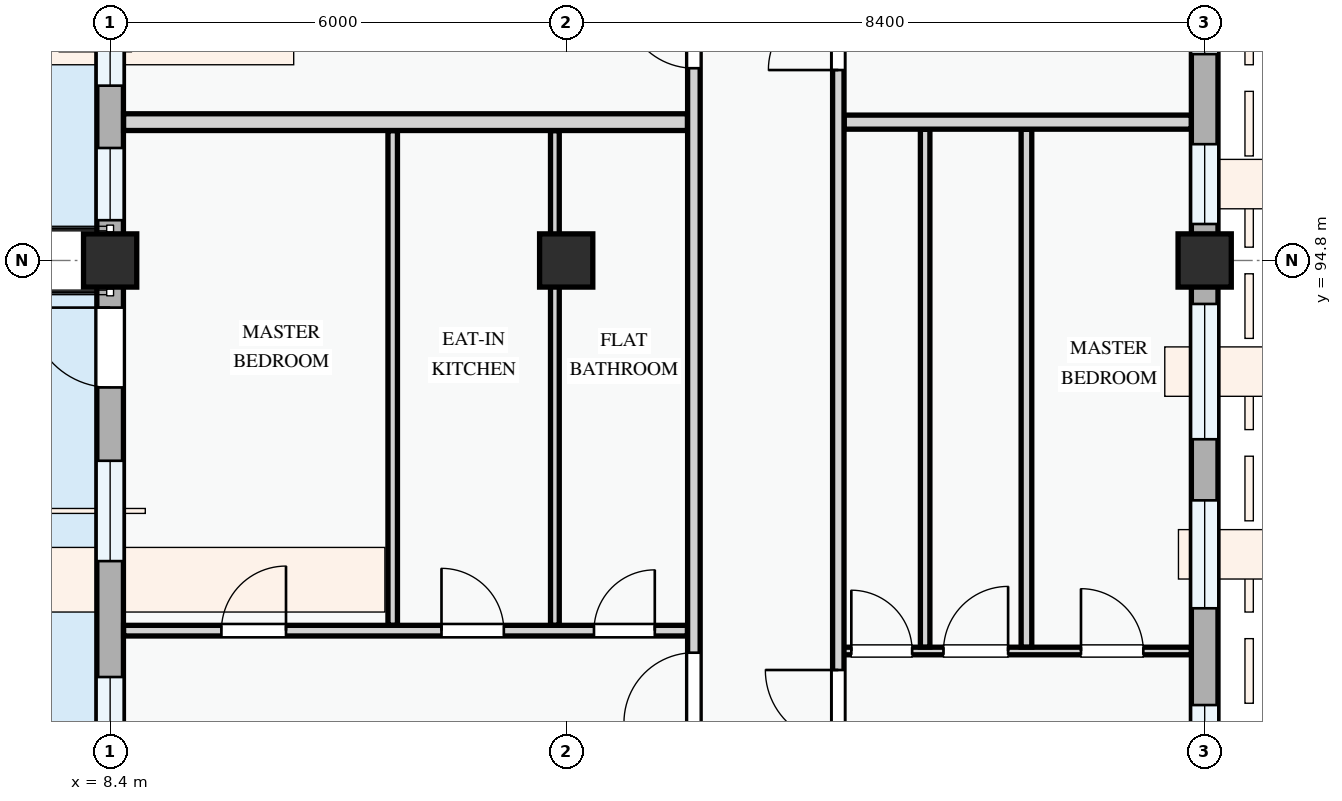
"""IFC4 building model, lengths in metres.
Left out: names, types, materials, properties, quantities, classifications, styles, units other than length and angle.
Written with IfcOpenShell. Run it as: python <this file> out.ifc"""

import sys

from ifc_helpers import new_model, si_unit, direction, frame, frame_2d, origin, origin_2d, place, context, subcontext, project, spatial, rectangle, extrude, element, fill, save


model = new_model("IFC4")
c1 = context("Model", 3, precision=1e-05, world=origin(), true_north=direction((0.0, 1.0)))
c2 = subcontext(c1, "Body", "Model", "MODEL_VIEW")
j1 = project(units=[si_unit("LENGTHUNIT", "METRE"), si_unit("PLANEANGLEUNIT", "RADIAN")], contexts=[c1])
p1 = place(None, origin())
s1 = spatial("IfcSite", under=j1, at=p1, CompositionType="ELEMENT")
p2 = place(p1, origin())
s2 = spatial("IfcBuilding", under=s1, at=p2, CompositionType="ELEMENT")
p3 = place(p2, frame((0.0, 0.0, 14.7)))
s3 = spatial("IfcBuildingStorey", under=s2, at=p3, CompositionType="ELEMENT", Elevation=14.7)
for number, where, z_axis, x_axis in (
    (1, (8.4, 94.8, 0.0), (0.0, 0.0, 1.0), (1.0, 0.0, 0.0)),
    (2, (14.4, 94.8, 0.0), (0.0, 0.0, 1.0), (1.0, 0.0, 0.0)),
    (3, (22.8, 94.8, 0.0), (0.0, 0.0, 1.0), (1.0, 0.0, 0.0)),
):
    element("IfcColumn", number, at=place(p3, frame(where, z_axis=z_axis, x_axis=x_axis)), inside=s3, PredefinedType="COLUMN", context=c2, shape_type="SweptSolid", body=[
        extrude(rectangle(XDim=0.7, YDim=0.7, at=origin_2d()), origin(), (0.0, 0.0, 1.0), 3.3),
    ])
p4 = place(p3, frame((8.4, 100.8, 0.0), z_axis=(0.0, 0.0, 1.0), x_axis=(0.0, -1.0, 0.0)))
e4 = element("IfcWall", 4, at=p4, inside=s3, PredefinedType="STANDARD", context=c2, shape_type="SweptSolid", body=[
    extrude(rectangle(XDim=6.0, YDim=0.35, at=frame_2d((3.0, 0.0))), origin(), (0.0, 0.0, 1.0), 2.445),
])
p5 = place(p4, frame((0.62, 0.0, 0.0)))
e5 = element("IfcOpeningElement", 5, at=p5, cuts=e4, PredefinedType="OPENING", context=c2, shape_type="SweptSolid", body=[
    extrude(rectangle(XDim=1.6, YDim=2.2, at=frame_2d((0.8, 1.1))), frame((0.0, 0.185, 0.0), z_axis=(0.0, -1.0, 0.0), x_axis=(1.0, 0.0, 0.0)), (0.0, 0.0, 1.0), 0.37),
])
p6 = place(p4, frame((2.75, 0.0, 0.78)))
e6 = element("IfcOpeningElement", 6, at=p6, cuts=e4, PredefinedType="OPENING", context=c2, shape_type="SweptSolid", body=[
    extrude(rectangle(XDim=0.95, YDim=1.15, at=frame_2d((0.475, 0.575))), frame((0.0, 0.185, 0.0), z_axis=(0.0, -1.0, 0.0), x_axis=(1.0, 0.0, 0.0)), (0.0, 0.0, 1.0), 0.37),
])
p7 = place(p4, frame((4.52, 0.0, 0.78)))
e7 = element("IfcOpeningElement", 7, at=p7, cuts=e4, PredefinedType="OPENING", context=c2, shape_type="SweptSolid", body=[
    extrude(rectangle(XDim=0.95, YDim=1.15, at=frame_2d((0.475, 0.575))), frame((0.0, 0.185, 0.0), z_axis=(0.0, -1.0, 0.0), x_axis=(1.0, 0.0, 0.0)), (0.0, 0.0, 1.0), 0.37),
])
p8 = place(p3, frame((8.4, 94.8, 0.0), z_axis=(0.0, 0.0, 1.0), x_axis=(0.0, -1.0, 0.0)))
e8 = element("IfcWall", 8, at=p8, inside=s3, PredefinedType="STANDARD", context=c2, shape_type="SweptSolid", body=[
    extrude(rectangle(XDim=8.4, YDim=0.35, at=frame_2d((4.2, 0.0))), origin(), (0.0, 0.0, 1.0), 2.345),
])
p9 = place(p8, frame((0.62, 0.0, 0.0)))
e9 = element("IfcOpeningElement", 9, at=p9, cuts=e8, PredefinedType="OPENING", context=c2, shape_type="SweptSolid", body=[
    extrude(rectangle(XDim=1.05, YDim=2.15, at=frame_2d((0.525, 1.075))), frame((0.0, 0.185, 0.0), z_axis=(0.0, -1.0, 0.0), x_axis=(1.0, 0.0, 0.0)), (0.0, 0.0, 1.0), 0.37),
])
p10 = place(p8, frame((2.635, 0.0, 0.78)))
e10 = element("IfcOpeningElement", 10, at=p10, cuts=e8, PredefinedType="OPENING", context=c2, shape_type="SweptSolid", body=[
    extrude(rectangle(XDim=1.32, YDim=1.35, at=frame_2d((0.66, 0.675))), frame((0.0, 0.185, 0.0), z_axis=(0.0, -1.0, 0.0), x_axis=(1.0, 0.0, 0.0)), (0.0, 0.0, 1.0), 0.37),
])
p11 = place(p8, frame((5.48, 0.0, 0.78)))
e11 = element("IfcOpeningElement", 11, at=p11, cuts=e8, PredefinedType="OPENING", context=c2, shape_type="SweptSolid", body=[
    extrude(rectangle(XDim=2.12, YDim=1.44, at=frame_2d((1.06, 0.72))), frame((0.0, 0.185, 0.0), z_axis=(0.0, -1.0, 0.0), x_axis=(1.0, 0.0, 0.0)), (0.0, 0.0, 1.0), 0.37),
])
p12 = place(p3, frame((22.8, 86.4, 0.0), z_axis=(0.0, 0.0, 1.0), x_axis=(0.0, 1.0, 0.0)))
e12 = element("IfcWall", 12, at=p12, inside=s3, PredefinedType="STANDARD", context=c2, shape_type="SweptSolid", body=[
    extrude(rectangle(XDim=8.4, YDim=0.35, at=frame_2d((4.2, 0.0))), origin(), (0.0, 0.0, 1.0), 2.425),
])
p13 = place(p12, frame((0.901, 0.0, 0.78)))
e13 = element("IfcOpeningElement", 13, at=p13, cuts=e12, PredefinedType="OPENING", context=c2, shape_type="SweptSolid", body=[
    extrude(rectangle(XDim=1.65, YDim=1.5, at=frame_2d((0.825, 0.75))), frame((0.0, 0.185, 0.0), z_axis=(0.0, -1.0, 0.0), x_axis=(1.0, 0.0, 0.0)), (0.0, 0.0, 1.0), 0.37),
])
p14 = place(p12, frame((3.824, 0.0, 0.78)))
e14 = element("IfcOpeningElement", 14, at=p14, cuts=e12, PredefinedType="OPENING", context=c2, shape_type="SweptSolid", body=[
    extrude(rectangle(XDim=1.42, YDim=1.38, at=frame_2d((0.71, 0.69))), frame((0.0, 0.185, 0.0), z_axis=(0.0, -1.0, 0.0), x_axis=(1.0, 0.0, 0.0)), (0.0, 0.0, 1.0), 0.37),
])
p15 = place(p12, frame((6.048, 0.0, 0.78)))
e15 = element("IfcOpeningElement", 15, at=p15, cuts=e12, PredefinedType="OPENING", context=c2, shape_type="SweptSolid", body=[
    extrude(rectangle(XDim=1.78, YDim=1.42, at=frame_2d((0.89, 0.71))), frame((0.0, 0.185, 0.0), z_axis=(0.0, -1.0, 0.0), x_axis=(1.0, 0.0, 0.0)), (0.0, 0.0, 1.0), 0.37),
])
p16 = place(p3, frame((22.8, 94.8, 0.0), z_axis=(0.0, 0.0, 1.0), x_axis=(0.0, 1.0, 0.0)))
e16 = element("IfcWall", 16, at=p16, inside=s3, PredefinedType="STANDARD", context=c2, shape_type="SweptSolid", body=[
    extrude(rectangle(XDim=6.0, YDim=0.35, at=frame_2d((3.0, 0.0))), origin(), (0.0, 0.0, 1.0), 2.575),
])
p17 = place(p16, frame((0.48, 0.0, 0.78)))
e17 = element("IfcOpeningElement", 17, at=p17, cuts=e16, PredefinedType="OPENING", context=c2, shape_type="SweptSolid", body=[
    extrude(rectangle(XDim=1.05, YDim=1.2, at=frame_2d((0.525, 0.6))), frame((0.0, 0.185, 0.0), z_axis=(0.0, -1.0, 0.0), x_axis=(1.0, 0.0, 0.0)), (0.0, 0.0, 1.0), 0.37),
])
p18 = place(p16, frame((2.715, 0.0, 0.78)))
e18 = element("IfcOpeningElement", 18, at=p18, cuts=e16, PredefinedType="OPENING", context=c2, shape_type="SweptSolid", body=[
    extrude(rectangle(XDim=2.2, YDim=1.5, at=frame_2d((1.1, 0.75))), frame((0.0, 0.185, 0.0), z_axis=(0.0, -1.0, 0.0), x_axis=(1.0, 0.0, 0.0)), (0.0, 0.0, 1.0), 0.37),
])
p19 = place(p3, frame((8.577, 89.93, 0.0), z_axis=(0.0, 0.0, 1.0), x_axis=(1.0, 0.0, 0.0)))
e19 = element("IfcWall", 19, at=p19, inside=s3, PredefinedType="PARTITIONING", context=c2, shape_type="SweptSolid", body=[
    extrude(rectangle(XDim=7.419, YDim=0.14, at=frame_2d((3.709, 0.0))), origin(), (0.0, 0.0, 1.0), 3.0),
])
p20 = place(p19, frame((1.287, 0.0, 0.0)))
e20 = element("IfcOpeningElement", 20, at=p20, cuts=e19, PredefinedType="OPENING", context=c2, shape_type="SweptSolid", body=[
    extrude(rectangle(XDim=0.85, YDim=2.1, at=frame_2d((0.425, 1.05))), frame((0.0, 0.08, 0.0), z_axis=(0.0, -1.0, 0.0), x_axis=(1.0, 0.0, 0.0)), (0.0, 0.0, 1.0), 0.16),
])
p21 = place(p19, frame((4.182, 0.0, 0.0)))
e21 = element("IfcOpeningElement", 21, at=p21, cuts=e19, PredefinedType="OPENING", context=c2, shape_type="SweptSolid", body=[
    extrude(rectangle(XDim=0.82, YDim=2.08, at=frame_2d((0.41, 1.04))), frame((0.0, 0.08, 0.0), z_axis=(0.0, -1.0, 0.0), x_axis=(1.0, 0.0, 0.0)), (0.0, 0.0, 1.0), 0.16),
])
p22 = place(p19, frame((6.189, 0.0, 0.0)))
e22 = element("IfcOpeningElement", 22, at=p22, cuts=e19, PredefinedType="OPENING", context=c2, shape_type="SweptSolid", body=[
    extrude(rectangle(XDim=0.8, YDim=2.1, at=frame_2d((0.4, 1.05))), frame((0.0, 0.08, 0.0), z_axis=(0.0, -1.0, 0.0), x_axis=(1.0, 0.0, 0.0)), (0.0, 0.0, 1.0), 0.16),
])
p23 = place(p3, frame((12.118, 90.002, 0.0), z_axis=(0.0, 0.0, 1.0), x_axis=(0.0, 1.0, 0.0)))
e23 = element("IfcWall", 23, at=p23, inside=s3, PredefinedType="PARTITIONING", context=c2, shape_type="SweptSolid", body=[
    extrude(rectangle(XDim=6.506, YDim=0.125, at=frame_2d((3.253, 0.0))), origin(), (0.0, 0.0, 1.0), 3.0),
])
p24 = place(p3, frame((14.251, 90.002, 0.0), z_axis=(0.0, 0.0, 1.0), x_axis=(0.0, 1.0, 0.0)))
e24 = element("IfcWall", 24, at=p24, inside=s3, PredefinedType="PARTITIONING", context=c2, shape_type="SweptSolid", body=[
    extrude(rectangle(XDim=6.506, YDim=0.115, at=frame_2d((3.253, 0.0))), origin(), (0.0, 0.0, 1.0), 2.425),
])
p25 = place(p3, frame((17.98, 89.662, 0.0), z_axis=(0.0, 0.0, 1.0), x_axis=(1.0, 0.0, 0.0)))
e25 = element("IfcWall", 25, at=p25, inside=s3, PredefinedType="PARTITIONING", context=c2, shape_type="SweptSolid", body=[
    extrude(rectangle(XDim=4.643, YDim=0.1, at=frame_2d((2.322, 0.0))), origin(), (0.0, 0.0, 1.0), 3.0),
])
p26 = place(p25, frame((0.171, 0.0, 0.0)))
e26 = element("IfcOpeningElement", 26, at=p26, cuts=e25, PredefinedType="OPENING", context=c2, shape_type="SweptSolid", body=[
    extrude(rectangle(XDim=0.8, YDim=2.1, at=frame_2d((0.4, 1.05))), frame((0.0, 0.06, 0.0), z_axis=(0.0, -1.0, 0.0), x_axis=(1.0, 0.0, 0.0)), (0.0, 0.0, 1.0), 0.12),
])
p27 = place(p25, frame((1.384, 0.0, 0.0)))
e27 = element("IfcOpeningElement", 27, at=p27, cuts=e25, PredefinedType="OPENING", context=c2, shape_type="SweptSolid", body=[
    extrude(rectangle(XDim=0.85, YDim=2.1, at=frame_2d((0.425, 1.05))), frame((0.0, 0.06, 0.0), z_axis=(0.0, -1.0, 0.0), x_axis=(1.0, 0.0, 0.0)), (0.0, 0.0, 1.0), 0.12),
])
p28 = place(p25, frame((3.193, 0.0, 0.0)))
e28 = element("IfcOpeningElement", 28, at=p28, cuts=e25, PredefinedType="OPENING", context=c2, shape_type="SweptSolid", body=[
    extrude(rectangle(XDim=0.82, YDim=2.08, at=frame_2d((0.41, 1.04))), frame((0.0, 0.06, 0.0), z_axis=(0.0, -1.0, 0.0), x_axis=(1.0, 0.0, 0.0)), (0.0, 0.0, 1.0), 0.12),
])
p29 = place(p3, frame((20.455, 89.714, 0.0), z_axis=(0.0, 0.0, 1.0), x_axis=(0.0, 1.0, 0.0)))
e29 = element("IfcWall", 29, at=p29, inside=s3, PredefinedType="PARTITIONING", context=c2, shape_type="SweptSolid", body=[
    extrude(rectangle(XDim=6.811, YDim=0.14, at=frame_2d((3.406, 0.0))), origin(), (0.0, 0.0, 1.0), 3.0),
])
p30 = place(p3, frame((19.122, 89.714, 0.0), z_axis=(0.0, 0.0, 1.0), x_axis=(0.0, 1.0, 0.0)))
e30 = element("IfcWall", 30, at=p30, inside=s3, PredefinedType="PARTITIONING", context=c2, shape_type="SweptSolid", body=[
    extrude(rectangle(XDim=6.811, YDim=0.125, at=frame_2d((3.406, 0.0))), origin(), (0.0, 0.0, 1.0), 3.0),
])
p31 = place(p3, frame((8.577, 96.62, 0.0), z_axis=(0.0, 0.0, 1.0), x_axis=(1.0, 0.0, 0.0)))
e31 = element("IfcWall", 31, at=p31, inside=s3, PredefinedType="PARTITIONING", context=c2, shape_type="SweptSolid", body=[
    extrude(rectangle(XDim=7.419, YDim=0.22, at=frame_2d((3.709, 0.0))), origin(), (0.0, 0.0, 1.0), 3.0),
])
p32 = place(p3, frame((18.057, 96.62, 0.0), z_axis=(0.0, 0.0, 1.0), x_axis=(1.0, 0.0, 0.0)))
e32 = element("IfcWall", 32, at=p32, inside=s3, PredefinedType="PARTITIONING", context=c2, shape_type="SweptSolid", body=[
    extrude(rectangle(XDim=4.566, YDim=0.185, at=frame_2d((2.283, 0.0))), origin(), (0.0, 0.0, 1.0), 3.0),
])
p33 = place(p3, frame((16.08, 72.177, 0.0), z_axis=(0.0, 0.0, 1.0), x_axis=(0.0, 1.0, 0.0)))
e33 = element("IfcWall", 33, at=p33, inside=s3, PredefinedType="PARTITIONING", context=c2, shape_type="SweptSolid", body=[
    extrude(rectangle(XDim=37.163, YDim=0.165, at=frame_2d((18.582, 0.0))), origin(), (0.0, 0.0, 1.0), 3.0),
])
p34 = place(p33, frame((3.489, 0.0, 0.0)))
e34 = element("IfcOpeningElement", 34, at=p34, cuts=e33, PredefinedType="OPENING", context=c2, shape_type="SweptSolid", body=[
    extrude(rectangle(XDim=0.92, YDim=2.1, at=frame_2d((0.46, 1.05))), frame((0.0, 0.093, 0.0), z_axis=(0.0, -1.0, 0.0), x_axis=(1.0, 0.0, 0.0)), (0.0, 0.0, 1.0), 0.185),
])
p35 = place(p33, frame((16.543, 0.0, 0.0)))
e35 = element("IfcOpeningElement", 35, at=p35, cuts=e33, PredefinedType="OPENING", context=c2, shape_type="SweptSolid", body=[
    extrude(rectangle(XDim=0.92, YDim=2.1, at=frame_2d((0.46, 1.05))), frame((0.0, 0.093, 0.0), z_axis=(0.0, -1.0, 0.0), x_axis=(1.0, 0.0, 0.0)), (0.0, 0.0, 1.0), 0.185),
])
p36 = place(p33, frame((25.152, 0.0, 0.0)))
e36 = element("IfcOpeningElement", 36, at=p36, cuts=e33, PredefinedType="OPENING", context=c2, shape_type="SweptSolid", body=[
    extrude(rectangle(XDim=0.92, YDim=2.1, at=frame_2d((0.46, 1.05))), frame((0.0, 0.093, 0.0), z_axis=(0.0, -1.0, 0.0), x_axis=(1.0, 0.0, 0.0)), (0.0, 0.0, 1.0), 0.185),
])
p37 = place(p3, frame((17.98, 72.177, 0.0), z_axis=(0.0, 0.0, 1.0), x_axis=(0.0, 1.0, 0.0)))
e37 = element("IfcWall", 37, at=p37, inside=s3, PredefinedType="PARTITIONING", context=c2, shape_type="SweptSolid", body=[
    extrude(rectangle(XDim=37.163, YDim=0.15, at=frame_2d((18.582, 0.0))), origin(), (0.0, 0.0, 1.0), 3.0),
])
p38 = place(p37, frame((3.551, 0.0, 0.0)))
e38 = element("IfcOpeningElement", 38, at=p38, cuts=e37, PredefinedType="OPENING", context=c2, shape_type="SweptSolid", body=[
    extrude(rectangle(XDim=0.92, YDim=2.1, at=frame_2d((0.46, 1.05))), frame((0.0, 0.085, 0.0), z_axis=(0.0, -1.0, 0.0), x_axis=(1.0, 0.0, 0.0)), (0.0, 0.0, 1.0), 0.17),
])
p39 = place(p37, frame((16.275, 0.0, 0.0)))
e39 = element("IfcOpeningElement", 39, at=p39, cuts=e37, PredefinedType="OPENING", context=c2, shape_type="SweptSolid", body=[
    extrude(rectangle(XDim=0.96, YDim=2.12, at=frame_2d((0.48, 1.06))), frame((0.0, 0.085, 0.0), z_axis=(0.0, -1.0, 0.0), x_axis=(1.0, 0.0, 0.0)), (0.0, 0.0, 1.0), 0.17),
])
p40 = place(p37, frame((25.128, 0.0, 0.0)))
e40 = element("IfcOpeningElement", 40, at=p40, cuts=e37, PredefinedType="OPENING", context=c2, shape_type="SweptSolid", body=[
    extrude(rectangle(XDim=0.92, YDim=2.1, at=frame_2d((0.46, 1.05))), frame((0.0, 0.085, 0.0), z_axis=(0.0, -1.0, 0.0), x_axis=(1.0, 0.0, 0.0)), (0.0, 0.0, 1.0), 0.17),
])
p41 = place(p6, origin())
e41 = element("IfcWindow", 41, at=p41, inside=s3, PartitioningType="SINGLE_PANEL", PredefinedType="WINDOW", context=c2, shape_type="SweptSolid", body=[
    extrude(rectangle(XDim=0.95, YDim=1.15, at=frame_2d((0.475, 0.575))), frame((0.0, 0.03, 0.0), z_axis=(0.0, -1.0, 0.0), x_axis=(1.0, 0.0, 0.0)), (0.0, 0.0, 1.0), 0.06),
])
fill(e6, e41)
p42 = place(p7, origin())
e42 = element("IfcWindow", 42, at=p42, inside=s3, PartitioningType="SINGLE_PANEL", PredefinedType="WINDOW", context=c2, shape_type="SweptSolid", body=[
    extrude(rectangle(XDim=0.95, YDim=1.15, at=frame_2d((0.475, 0.575))), frame((0.0, 0.03, 0.0), z_axis=(0.0, -1.0, 0.0), x_axis=(1.0, 0.0, 0.0)), (0.0, 0.0, 1.0), 0.06),
])
fill(e7, e42)
p43 = place(p9, frame((1.05, 0.0, 0.0), z_axis=(0.0, 0.0, 1.0), x_axis=(-1.0, 0.0, 0.0)))
e43 = element("IfcDoor", 43, at=p43, inside=s3, OperationType="SINGLE_SWING_RIGHT", PredefinedType="DOOR", context=c2, shape_type="SweptSolid", body=[
    extrude(rectangle(XDim=1.05, YDim=2.15, at=frame_2d((0.525, 1.075))), frame((0.0, 0.025, 0.0), z_axis=(0.0, -1.0, 0.0), x_axis=(1.0, 0.0, 0.0)), (0.0, 0.0, 1.0), 0.05),
])
fill(e9, e43)
p44 = place(p10, origin())
e44 = element("IfcWindow", 44, at=p44, inside=s3, PartitioningType="SINGLE_PANEL", PredefinedType="WINDOW", context=c2, shape_type="SweptSolid", body=[
    extrude(rectangle(XDim=1.32, YDim=1.35, at=frame_2d((0.66, 0.675))), frame((0.0, 0.03, 0.0), z_axis=(0.0, -1.0, 0.0), x_axis=(1.0, 0.0, 0.0)), (0.0, 0.0, 1.0), 0.06),
])
fill(e10, e44)
p45 = place(p11, origin())
e45 = element("IfcWindow", 45, at=p45, inside=s3, PartitioningType="DOUBLE_PANEL_VERTICAL", PredefinedType="WINDOW", context=c2, shape_type="SweptSolid", body=[
    extrude(rectangle(XDim=2.12, YDim=1.44, at=frame_2d((1.06, 0.72))), frame((0.0, 0.03, 0.0), z_axis=(0.0, -1.0, 0.0), x_axis=(1.0, 0.0, 0.0)), (0.0, 0.0, 1.0), 0.06),
])
fill(e11, e45)
p46 = place(p13, origin())
e46 = element("IfcWindow", 46, at=p46, inside=s3, PartitioningType="DOUBLE_PANEL_VERTICAL", PredefinedType="WINDOW", context=c2, shape_type="SweptSolid", body=[
    extrude(rectangle(XDim=1.65, YDim=1.5, at=frame_2d((0.825, 0.75))), frame((0.0, 0.03, 0.0), z_axis=(0.0, -1.0, 0.0), x_axis=(1.0, 0.0, 0.0)), (0.0, 0.0, 1.0), 0.06),
])
fill(e13, e46)
p47 = place(p14, origin())
e47 = element("IfcWindow", 47, at=p47, inside=s3, PartitioningType="SINGLE_PANEL", PredefinedType="WINDOW", context=c2, shape_type="SweptSolid", body=[
    extrude(rectangle(XDim=1.42, YDim=1.38, at=frame_2d((0.71, 0.69))), frame((0.0, 0.03, 0.0), z_axis=(0.0, -1.0, 0.0), x_axis=(1.0, 0.0, 0.0)), (0.0, 0.0, 1.0), 0.06),
])
fill(e14, e47)
p48 = place(p15, origin())
e48 = element("IfcWindow", 48, at=p48, inside=s3, PartitioningType="DOUBLE_PANEL_VERTICAL", PredefinedType="WINDOW", context=c2, shape_type="SweptSolid", body=[
    extrude(rectangle(XDim=1.78, YDim=1.42, at=frame_2d((0.89, 0.71))), frame((0.0, 0.03, 0.0), z_axis=(0.0, -1.0, 0.0), x_axis=(1.0, 0.0, 0.0)), (0.0, 0.0, 1.0), 0.06),
])
fill(e15, e48)
p49 = place(p17, origin())
e49 = element("IfcWindow", 49, at=p49, inside=s3, PartitioningType="SINGLE_PANEL", PredefinedType="WINDOW", context=c2, shape_type="SweptSolid", body=[
    extrude(rectangle(XDim=1.05, YDim=1.2, at=frame_2d((0.525, 0.6))), frame((0.0, 0.03, 0.0), z_axis=(0.0, -1.0, 0.0), x_axis=(1.0, 0.0, 0.0)), (0.0, 0.0, 1.0), 0.06),
])
fill(e17, e49)
p50 = place(p18, origin())
e50 = element("IfcWindow", 50, at=p50, inside=s3, PartitioningType="DOUBLE_PANEL_VERTICAL", PredefinedType="WINDOW", context=c2, shape_type="SweptSolid", body=[
    extrude(rectangle(XDim=2.2, YDim=1.5, at=frame_2d((1.1, 0.75))), frame((0.0, 0.03, 0.0), z_axis=(0.0, -1.0, 0.0), x_axis=(1.0, 0.0, 0.0)), (0.0, 0.0, 1.0), 0.06),
])
fill(e18, e50)
p51 = place(p20, origin())
e51 = element("IfcDoor", 51, at=p51, inside=s3, OperationType="SINGLE_SWING_RIGHT", PredefinedType="DOOR", context=c2, shape_type="SweptSolid", body=[
    extrude(rectangle(XDim=0.85, YDim=2.1, at=frame_2d((0.425, 1.05))), frame((0.0, 0.025, 0.0), z_axis=(0.0, -1.0, 0.0), x_axis=(1.0, 0.0, 0.0)), (0.0, 0.0, 1.0), 0.05),
])
fill(e20, e51)
p52 = place(p21, origin())
e52 = element("IfcDoor", 52, at=p52, inside=s3, OperationType="SINGLE_SWING_LEFT", PredefinedType="DOOR", context=c2, shape_type="SweptSolid", body=[
    extrude(rectangle(XDim=0.82, YDim=2.08, at=frame_2d((0.41, 1.04))), frame((0.0, 0.025, 0.0), z_axis=(0.0, -1.0, 0.0), x_axis=(1.0, 0.0, 0.0)), (0.0, 0.0, 1.0), 0.05),
])
fill(e21, e52)
p53 = place(p22, origin())
e53 = element("IfcDoor", 53, at=p53, inside=s3, OperationType="SINGLE_SWING_RIGHT", PredefinedType="DOOR", context=c2, shape_type="SweptSolid", body=[
    extrude(rectangle(XDim=0.8, YDim=2.1, at=frame_2d((0.4, 1.05))), frame((0.0, 0.025, 0.0), z_axis=(0.0, -1.0, 0.0), x_axis=(1.0, 0.0, 0.0)), (0.0, 0.0, 1.0), 0.05),
])
fill(e22, e53)
p54 = place(p26, origin())
e54 = element("IfcDoor", 54, at=p54, inside=s3, OperationType="SINGLE_SWING_LEFT", PredefinedType="DOOR", context=c2, shape_type="SweptSolid", body=[
    extrude(rectangle(XDim=0.8, YDim=2.1, at=frame_2d((0.4, 1.05))), frame((0.0, 0.025, 0.0), z_axis=(0.0, -1.0, 0.0), x_axis=(1.0, 0.0, 0.0)), (0.0, 0.0, 1.0), 0.05),
])
fill(e26, e54)
p55 = place(p27, origin())
e55 = element("IfcDoor", 55, at=p55, inside=s3, OperationType="SINGLE_SWING_RIGHT", PredefinedType="DOOR", context=c2, shape_type="SweptSolid", body=[
    extrude(rectangle(XDim=0.85, YDim=2.1, at=frame_2d((0.425, 1.05))), frame((0.0, 0.025, 0.0), z_axis=(0.0, -1.0, 0.0), x_axis=(1.0, 0.0, 0.0)), (0.0, 0.0, 1.0), 0.05),
])
fill(e27, e55)
p56 = place(p28, origin())
e56 = element("IfcDoor", 56, at=p56, inside=s3, OperationType="SINGLE_SWING_LEFT", PredefinedType="DOOR", context=c2, shape_type="SweptSolid", body=[
    extrude(rectangle(XDim=0.82, YDim=2.08, at=frame_2d((0.41, 1.04))), frame((0.0, 0.025, 0.0), z_axis=(0.0, -1.0, 0.0), x_axis=(1.0, 0.0, 0.0)), (0.0, 0.0, 1.0), 0.05),
])
fill(e28, e56)
p57 = place(p35, origin())
e57 = element("IfcDoor", 57, at=p57, inside=s3, OperationType="SINGLE_SWING_LEFT", PredefinedType="DOOR", context=c2, shape_type="SweptSolid", body=[
    extrude(rectangle(XDim=0.92, YDim=2.1, at=frame_2d((0.46, 1.05))), frame((0.0, 0.025, 0.0), z_axis=(0.0, -1.0, 0.0), x_axis=(1.0, 0.0, 0.0)), (0.0, 0.0, 1.0), 0.05),
])
fill(e35, e57)
p58 = place(p36, origin())
e58 = element("IfcDoor", 58, at=p58, inside=s3, OperationType="SINGLE_SWING_RIGHT", PredefinedType="DOOR", context=c2, shape_type="SweptSolid", body=[
    extrude(rectangle(XDim=0.92, YDim=2.1, at=frame_2d((0.46, 1.05))), frame((0.0, 0.025, 0.0), z_axis=(0.0, -1.0, 0.0), x_axis=(1.0, 0.0, 0.0)), (0.0, 0.0, 1.0), 0.05),
])
fill(e36, e58)
p59 = place(p39, origin())
e59 = element("IfcDoor", 59, at=p59, inside=s3, OperationType="SINGLE_SWING_RIGHT", PredefinedType="DOOR", context=c2, shape_type="SweptSolid", body=[
    extrude(rectangle(XDim=0.96, YDim=2.12, at=frame_2d((0.48, 1.06))), frame((0.0, 0.025, 0.0), z_axis=(0.0, -1.0, 0.0), x_axis=(1.0, 0.0, 0.0)), (0.0, 0.0, 1.0), 0.05),
])
fill(e39, e59)
p60 = place(p40, origin())
e60 = element("IfcDoor", 60, at=p60, inside=s3, OperationType="SINGLE_SWING_LEFT", PredefinedType="DOOR", context=c2, shape_type="SweptSolid", body=[
    extrude(rectangle(XDim=0.92, YDim=2.1, at=frame_2d((0.46, 1.05))), frame((0.0, 0.025, 0.0), z_axis=(0.0, -1.0, 0.0), x_axis=(1.0, 0.0, 0.0)), (0.0, 0.0, 1.0), 0.05),
])
fill(e40, e60)
save(model, sys.argv[1])
